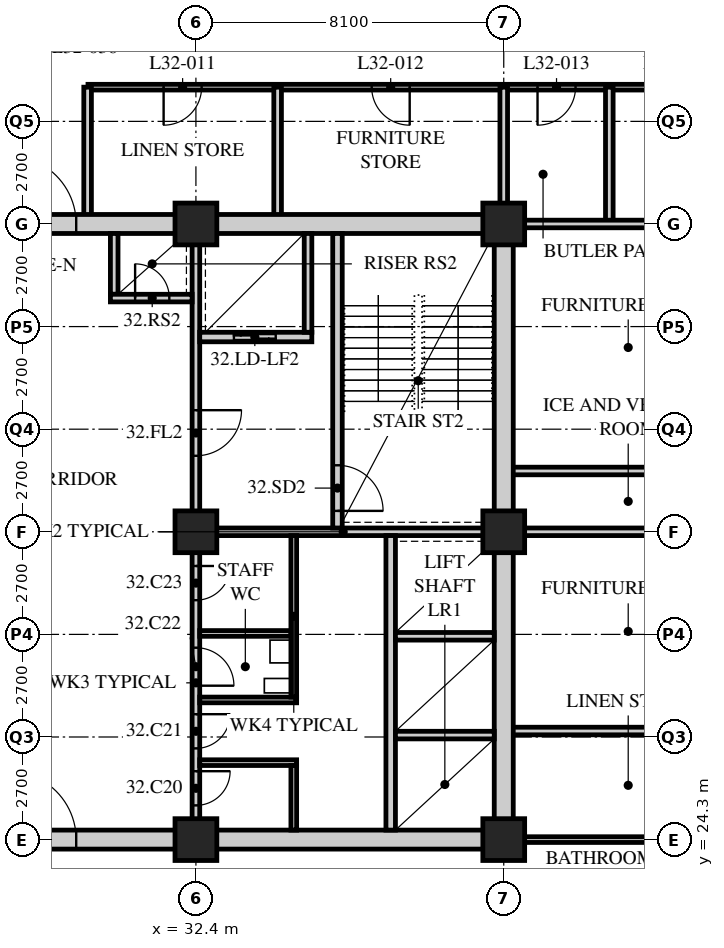
"""IFC4 building model, lengths in metres.
Left out: names, types, materials, properties, quantities, classifications, styles, units other than length and angle.
Written with IfcOpenShell. Run it as: python <this file> out.ifc"""

import sys

from ifc_helpers import new_model, si_unit, direction, frame, frame_2d, origin, origin_2d, place, context, subcontext, project, spatial, rectangle, hollow_rectangle, extrude, element, fill, save


model = new_model("IFC4")
c1 = context("Model", 3, precision=1e-05, world=origin(), true_north=direction((0.0, 1.0)))
c2 = subcontext(c1, "Body", "Model", "MODEL_VIEW")
j1 = project(units=[si_unit("LENGTHUNIT", "METRE"), si_unit("PLANEANGLEUNIT", "RADIAN")], contexts=[c1])
p1 = place(None, origin())
s1 = spatial("IfcSite", under=j1, at=p1, CompositionType="ELEMENT")
p2 = place(p1, origin())
s2 = spatial("IfcBuilding", under=s1, at=p2, CompositionType="ELEMENT")
p3 = place(p2, frame((0.0, 0.0, 127.2)))
s3 = spatial("IfcBuildingStorey", under=s2, at=p3, CompositionType="ELEMENT", Elevation=127.2)
for number, where, z_axis, x_axis in (
    (1, (32.4, 24.3, 0.0), (0.0, 0.0, 1.0), (1.0, 0.0, 0.0)),
    (2, (32.4, 32.4, 0.0), (0.0, 0.0, 1.0), (1.0, 0.0, 0.0)),
    (3, (32.4, 40.5, 0.0), (0.0, 0.0, 1.0), (1.0, 0.0, 0.0)),
    (4, (40.5, 24.3, 0.0), (0.0, 0.0, 1.0), (1.0, 0.0, 0.0)),
    (5, (40.5, 32.4, 0.0), (0.0, 0.0, 1.0), (1.0, 0.0, 0.0)),
    (6, (40.5, 40.5, 0.0), (0.0, 0.0, 1.0), (1.0, 0.0, 0.0)),
):
    element("IfcColumn", number, at=place(p3, frame(where, z_axis=z_axis, x_axis=x_axis)), inside=s3, PredefinedType="COLUMN", context=c2, shape_type="SweptSolid", body=[
        extrude(hollow_rectangle(XDim=1.1, YDim=1.1, WallThickness=0.1, at=origin_2d()), origin(), (0.0, 0.0, 1.0), 3.4),
    ])
p4 = place(p3, frame((46.8, 44.1, 0.0), z_axis=(0.0, 0.0, 1.0), x_axis=(-1.0, 0.0, 0.0)))
e7 = element("IfcWall", 7, at=p4, inside=s3, PredefinedType="PARTITIONING", context=c2, shape_type="SweptSolid", body=[
    extrude(rectangle(XDim=17.24, YDim=0.15, at=frame_2d((8.62, 0.0))), origin(), (0.0, 0.0, 1.0), 3.19),
])
p5 = place(p4, frame((14.25, 0.0, 0.0)))
e8 = element("IfcOpeningElement", 8, at=p5, cuts=e7, PredefinedType="OPENING", context=c2, shape_type="SweptSolid", body=[
    extrude(rectangle(XDim=1.0, YDim=2.1, at=frame_2d((0.5, 1.05))), frame((0.0, 0.085, 0.0), z_axis=(0.0, -1.0, 0.0), x_axis=(1.0, 0.0, 0.0)), (0.0, 0.0, 1.0), 0.17),
])
p6 = place(p4, frame((8.775, 0.0, 0.0)))
e9 = element("IfcOpeningElement", 9, at=p6, cuts=e7, PredefinedType="OPENING", context=c2, shape_type="SweptSolid", body=[
    extrude(rectangle(XDim=1.0, YDim=2.1, at=frame_2d((0.5, 1.05))), frame((0.0, 0.085, 0.0), z_axis=(0.0, -1.0, 0.0), x_axis=(1.0, 0.0, 0.0)), (0.0, 0.0, 1.0), 0.17),
])
p7 = place(p4, frame((4.411, 0.0, 0.0)))
e10 = element("IfcOpeningElement", 10, at=p7, cuts=e7, PredefinedType="OPENING", context=c2, shape_type="SweptSolid", body=[
    extrude(rectangle(XDim=1.0, YDim=2.1, at=frame_2d((0.5, 1.05))), frame((0.0, 0.085, 0.0), z_axis=(0.0, -1.0, 0.0), x_axis=(1.0, 0.0, 0.0)), (0.0, 0.0, 1.0), 0.17),
])
p8 = place(p4, frame((1.261, 0.0, 0.0)))
e11 = element("IfcOpeningElement", 11, at=p8, cuts=e7, PredefinedType="OPENING", context=c2, shape_type="SweptSolid", body=[
    extrude(rectangle(XDim=1.0, YDim=2.1, at=frame_2d((0.5, 1.05))), frame((0.0, 0.085, 0.0), z_axis=(0.0, -1.0, 0.0), x_axis=(1.0, 0.0, 0.0)), (0.0, 0.0, 1.0), 0.17),
])
p9 = place(p3, frame((40.7, 24.3, 0.0), z_axis=(0.0, 0.0, 1.0), x_axis=(1.0, 0.0, 0.0)))
e12 = element("IfcWall", 12, at=p9, inside=s3, PredefinedType="PARTITIONING", context=c2, shape_type="SweptSolid", body=[
    extrude(rectangle(XDim=6.1, YDim=0.15, at=frame_2d((3.05, 0.0))), origin(), (0.0, 0.0, 1.0), 3.19),
])
for number, where, z_axis, x_axis in (
    (13, (40.5, 32.4, 0.0), (0.0, 0.0, 1.0), (1.0, 0.0, 0.0)),
    (14, (46.8, 27.157, 0.0), (0.0, 0.0, 1.0), (-1.0, 0.0, 0.0)),
    (15, (46.8, 34.0, 0.0), (0.0, 0.0, 1.0), (-1.0, 0.0, 0.0)),
):
    element("IfcWall", number, at=place(p3, frame(where, z_axis=z_axis, x_axis=x_axis)), inside=s3, PredefinedType="SOLIDWALL", context=c2, shape_type="SweptSolid", body=[
        extrude(rectangle(XDim=6.3, YDim=0.2, at=frame_2d((3.15, 0.0))), origin(), (0.0, 0.0, 1.0), 3.19),
    ])
p10 = place(p3, frame((40.5, 40.5, 0.0), z_axis=(0.0, 0.0, 1.0), x_axis=(0.0, 1.0, 0.0)))
e16 = element("IfcWall", 16, at=p10, inside=s3, PredefinedType="SOLIDWALL", context=c2, shape_type="SweptSolid", body=[
    extrude(rectangle(XDim=3.6, YDim=0.2, at=frame_2d((1.8, 0.0))), origin(), (0.0, 0.0, 1.0), 2.578),
])
for number, where, z_axis, x_axis in (
    (17, (34.55, 44.1, 0.0), (0.0, 0.0, 1.0), (0.0, -1.0, 0.0)),
    (18, (43.278, 44.1, 0.0), (0.0, 0.0, 1.0), (0.0, -1.0, 0.0)),
    (19, (29.55, 40.5, 0.0), (0.0, 0.0, 1.0), (0.0, 1.0, 0.0)),
):
    element("IfcWall", number, at=place(p3, frame(where, z_axis=z_axis, x_axis=x_axis)), inside=s3, PredefinedType="SOLIDWALL", context=c2, shape_type="SweptSolid", body=[
        extrude(rectangle(XDim=3.6, YDim=0.2, at=frame_2d((1.8, 0.0))), origin(), (0.0, 0.0, 1.0), 3.19),
    ])
p11 = place(p3, frame((40.5, 40.5, 0.0), z_axis=(0.0, 0.0, 1.0), x_axis=(1.0, 0.0, 0.0)))
e20 = element("IfcWall", 20, at=p11, inside=s3, PredefinedType="SOLIDWALL", context=c2, shape_type="SweptSolid", body=[
    extrude(rectangle(XDim=6.3, YDim=0.2, at=frame_2d((3.15, 0.0))), origin(), (0.0, 0.0, 1.0), 3.19),
])
p12 = place(p3, frame((15.95, 24.3, 0.0), z_axis=(0.0, 0.0, 1.0), x_axis=(1.0, 0.0, 0.0)))
e21 = element("IfcWall", 21, at=p12, inside=s3, PredefinedType="SOLIDWALL", context=c2, shape_type="SweptSolid", body=[
    extrude(rectangle(XDim=24.8, YDim=0.5, at=frame_2d((12.4, 0.0))), origin(), (0.0, 0.0, 1.0), 2.54),
])
p13 = place(p12, frame((11.5, 0.0, 0.0)))
e22 = element("IfcOpeningElement", 22, at=p13, cuts=e21, PredefinedType="OPENING", context=c2, shape_type="SweptSolid", body=[
    extrude(rectangle(XDim=1.8, YDim=2.4, at=frame_2d((0.9, 1.2))), frame((0.0, 0.26, 0.0), z_axis=(0.0, -1.0, 0.0), x_axis=(1.0, 0.0, 0.0)), (0.0, 0.0, 1.0), 0.52),
])
p14 = place(p3, frame((15.95, 40.5, 0.0), z_axis=(0.0, 0.0, 1.0), x_axis=(1.0, 0.0, 0.0)))
e23 = element("IfcWall", 23, at=p14, inside=s3, PredefinedType="SOLIDWALL", context=c2, shape_type="SweptSolid", body=[
    extrude(rectangle(XDim=24.8, YDim=0.5, at=frame_2d((12.4, 0.0))), origin(), (0.0, 0.0, 1.0), 2.54),
])
p15 = place(p14, frame((11.5, 0.0, 0.0)))
e24 = element("IfcOpeningElement", 24, at=p15, cuts=e23, PredefinedType="OPENING", context=c2, shape_type="SweptSolid", body=[
    extrude(rectangle(XDim=1.8, YDim=2.4, at=frame_2d((0.9, 1.2))), frame((0.0, 0.26, 0.0), z_axis=(0.0, -1.0, 0.0), x_axis=(1.0, 0.0, 0.0)), (0.0, 0.0, 1.0), 0.52),
])
p16 = place(p3, frame((40.5, 24.55, 0.0), z_axis=(0.0, 0.0, 1.0), x_axis=(0.0, 1.0, 0.0)))
e25 = element("IfcWall", 25, at=p16, inside=s3, PredefinedType="SOLIDWALL", context=c2, shape_type="SweptSolid", body=[
    extrude(rectangle(XDim=15.7, YDim=0.5, at=frame_2d((7.85, 0.0))), origin(), (0.0, 0.0, 1.0), 2.578),
])
p17 = place(p3, frame((32.3, 32.4, 0.0), z_axis=(0.0, 0.0, 1.0), x_axis=(1.0, 0.0, 0.0)))
e26 = element("IfcWall", 26, at=p17, inside=s3, PredefinedType="SOLIDWALL", context=c2, shape_type="SweptSolid", body=[
    extrude(rectangle(XDim=7.95, YDim=0.2, at=frame_2d((3.975, 0.0))), origin(), (0.0, 0.0, 1.0), 2.578),
])
p18 = place(p3, frame((32.4, 32.5, 0.0), z_axis=(0.0, 0.0, 1.0), x_axis=(0.0, 1.0, 0.0)))
e27 = element("IfcWall", 27, at=p18, inside=s3, PredefinedType="SOLIDWALL", context=c2, shape_type="SweptSolid", body=[
    extrude(rectangle(XDim=7.75, YDim=0.2, at=frame_2d((3.875, 0.0))), origin(), (0.0, 0.0, 1.0), 2.578),
])
p19 = place(p18, frame((1.9, 0.0, 0.0)))
e28 = element("IfcOpeningElement", 28, at=p19, cuts=e27, PredefinedType="OPENING", context=c2, shape_type="SweptSolid", body=[
    extrude(rectangle(XDim=1.2, YDim=2.1, at=frame_2d((0.6, 1.05))), frame((0.0, 0.11, 0.0), z_axis=(0.0, -1.0, 0.0), x_axis=(1.0, 0.0, 0.0)), (0.0, 0.0, 1.0), 0.22),
])
p20 = place(p3, frame((37.525, 24.55, 0.0), z_axis=(0.0, 0.0, 1.0), x_axis=(0.0, 1.0, 0.0)))
e29 = element("IfcWall", 29, at=p20, inside=s3, PredefinedType="SOLIDWALL", context=c2, shape_type="SweptSolid", body=[
    extrude(rectangle(XDim=7.75, YDim=0.25, at=frame_2d((3.875, 0.0))), origin(), (0.0, 0.0, 1.0), 3.19),
])
for number, where, z_axis, x_axis in (
    (30, (37.65, 27.05, 0.0), (0.0, 0.0, 1.0), (1.0, 0.0, 0.0)),
    (31, (37.65, 29.65, 0.0), (0.0, 0.0, 1.0), (1.0, 0.0, 0.0)),
):
    element("IfcWall", number, at=place(p3, frame(where, z_axis=z_axis, x_axis=x_axis)), inside=s3, PredefinedType="SOLIDWALL", context=c2, shape_type="SweptSolid", body=[
        extrude(rectangle(XDim=2.6, YDim=0.2, at=frame_2d((1.3, 0.0))), origin(), (0.0, 0.0, 1.0), 3.19),
    ])
p21 = place(p3, frame((36.125, 32.5, 0.0), z_axis=(0.0, 0.0, 1.0), x_axis=(0.0, 1.0, 0.0)))
e32 = element("IfcWall", 32, at=p21, inside=s3, PredefinedType="SOLIDWALL", context=c2, shape_type="SweptSolid", body=[
    extrude(rectangle(XDim=7.75, YDim=0.25, at=frame_2d((3.875, 0.0))), origin(), (0.0, 0.0, 1.0), 3.19),
])
p22 = place(p21, frame((0.45, 0.0, 0.0)))
e33 = element("IfcOpeningElement", 33, at=p22, cuts=e32, PredefinedType="OPENING", context=c2, shape_type="SweptSolid", body=[
    extrude(rectangle(XDim=1.2, YDim=2.1, at=frame_2d((0.6, 1.05))), frame((0.0, 0.135, 0.0), z_axis=(0.0, -1.0, 0.0), x_axis=(1.0, 0.0, 0.0)), (0.0, 0.0, 1.0), 0.27),
])
p23 = place(p3, frame((32.5, 37.525, 0.0), z_axis=(0.0, 0.0, 1.0), x_axis=(1.0, 0.0, 0.0)))
e34 = element("IfcWall", 34, at=p23, inside=s3, PredefinedType="SOLIDWALL", context=c2, shape_type="SweptSolid", body=[
    extrude(rectangle(XDim=2.95, YDim=0.25, at=frame_2d((1.475, 0.0))), origin(), (0.0, 0.0, 1.0), 3.19),
])
p24 = place(p23, frame((0.9, 0.0, 0.0)))
e35 = element("IfcOpeningElement", 35, at=p24, cuts=e34, PredefinedType="OPENING", context=c2, shape_type="SweptSolid", body=[
    extrude(rectangle(XDim=1.1, YDim=2.4, at=frame_2d((0.55, 1.2))), frame((0.0, 0.135, 0.0), z_axis=(0.0, -1.0, 0.0), x_axis=(1.0, 0.0, 0.0)), (0.0, 0.0, 1.0), 0.27),
])
p25 = place(p3, frame((35.35, 37.65, 0.0), z_axis=(0.0, 0.0, 1.0), x_axis=(0.0, 1.0, 0.0)))
e36 = element("IfcWall", 36, at=p25, inside=s3, PredefinedType="SOLIDWALL", context=c2, shape_type="SweptSolid", body=[
    extrude(rectangle(XDim=2.6, YDim=0.2, at=frame_2d((1.3, 0.0))), origin(), (0.0, 0.0, 1.0), 3.19),
])
p26 = place(p3, frame((30.25, 38.65, 0.0), z_axis=(0.0, 0.0, 1.0), x_axis=(0.0, 1.0, 0.0)))
e37 = element("IfcWall", 37, at=p26, inside=s3, PredefinedType="SOLIDWALL", context=c2, shape_type="SweptSolid", body=[
    extrude(rectangle(XDim=1.6, YDim=0.2, at=frame_2d((0.8, 0.0))), origin(), (0.0, 0.0, 1.0), 3.19),
])
p27 = place(p3, frame((30.15, 38.55, 0.0), z_axis=(0.0, 0.0, 1.0), x_axis=(1.0, 0.0, 0.0)))
e38 = element("IfcWall", 38, at=p27, inside=s3, PredefinedType="SOLIDWALL", context=c2, shape_type="SweptSolid", body=[
    extrude(rectangle(XDim=2.15, YDim=0.2, at=frame_2d((1.075, 0.0))), origin(), (0.0, 0.0, 1.0), 3.19),
])
p28 = place(p27, frame((0.65, 0.0, 0.0)))
e39 = element("IfcOpeningElement", 39, at=p28, cuts=e38, PredefinedType="OPENING", context=c2, shape_type="SweptSolid", body=[
    extrude(rectangle(XDim=0.9, YDim=2.1, at=frame_2d((0.45, 1.05))), frame((0.0, 0.11, 0.0), z_axis=(0.0, -1.0, 0.0), x_axis=(1.0, 0.0, 0.0)), (0.0, 0.0, 1.0), 0.22),
])
p29 = place(p3, frame((32.4, 24.55, 0.0), z_axis=(0.0, 0.0, 1.0), x_axis=(0.0, 1.0, 0.0)))
e40 = element("IfcWall", 40, at=p29, inside=s3, PredefinedType="PARTITIONING", context=c2, shape_type="SweptSolid", body=[
    extrude(rectangle(XDim=7.75, YDim=0.2, at=frame_2d((3.875, 0.0))), origin(), (0.0, 0.0, 1.0), 2.578),
])
p30 = place(p29, frame((0.65, 0.0, 0.0)))
e41 = element("IfcOpeningElement", 41, at=p30, cuts=e40, PredefinedType="OPENING", context=c2, shape_type="SweptSolid", body=[
    extrude(rectangle(XDim=0.9, YDim=2.1, at=frame_2d((0.45, 1.05))), frame((0.0, 0.11, 0.0), z_axis=(0.0, -1.0, 0.0), x_axis=(1.0, 0.0, 0.0)), (0.0, 0.0, 1.0), 0.22),
])
p31 = place(p29, frame((2.15, 0.0, 0.0)))
e42 = element("IfcOpeningElement", 42, at=p31, cuts=e40, PredefinedType="OPENING", context=c2, shape_type="SweptSolid", body=[
    extrude(rectangle(XDim=0.9, YDim=2.1, at=frame_2d((0.45, 1.05))), frame((0.0, 0.11, 0.0), z_axis=(0.0, -1.0, 0.0), x_axis=(1.0, 0.0, 0.0)), (0.0, 0.0, 1.0), 0.22),
])
p32 = place(p29, frame((3.8, 0.0, 0.0)))
e43 = element("IfcOpeningElement", 43, at=p32, cuts=e40, PredefinedType="OPENING", context=c2, shape_type="SweptSolid", body=[
    extrude(rectangle(XDim=1.0, YDim=2.1, at=frame_2d((0.5, 1.05))), frame((0.0, 0.11, 0.0), z_axis=(0.0, -1.0, 0.0), x_axis=(1.0, 0.0, 0.0)), (0.0, 0.0, 1.0), 0.22),
])
p33 = place(p29, frame((6.05, 0.0, 0.0)))
e44 = element("IfcOpeningElement", 44, at=p33, cuts=e40, PredefinedType="OPENING", context=c2, shape_type="SweptSolid", body=[
    extrude(rectangle(XDim=0.9, YDim=2.1, at=frame_2d((0.45, 1.05))), frame((0.0, 0.11, 0.0), z_axis=(0.0, -1.0, 0.0), x_axis=(1.0, 0.0, 0.0)), (0.0, 0.0, 1.0), 0.22),
])
for number, where, z_axis, x_axis in (
    (45, (32.5, 26.325, 0.0), (0.0, 0.0, 1.0), (1.0, 0.0, 0.0)),
    (46, (32.5, 27.975, 0.0), (0.0, 0.0, 1.0), (1.0, 0.0, 0.0)),
):
    element("IfcWall", number, at=place(p3, frame(where, z_axis=z_axis, x_axis=x_axis)), inside=s3, PredefinedType="PARTITIONING", context=c2, shape_type="SweptSolid", body=[
        extrude(rectangle(XDim=2.55, YDim=0.15, at=frame_2d((1.275, 0.0))), origin(), (0.0, 0.0, 1.0), 3.19),
    ])
p34 = place(p3, frame((32.5, 29.725, 0.0), z_axis=(0.0, 0.0, 1.0), x_axis=(1.0, 0.0, 0.0)))
e47 = element("IfcWall", 47, at=p34, inside=s3, PredefinedType="PARTITIONING", context=c2, shape_type="SweptSolid", body=[
    extrude(rectangle(XDim=2.4, YDim=0.15, at=frame_2d((1.2, 0.0))), origin(), (0.0, 0.0, 1.0), 3.19),
])
p35 = place(p3, frame((34.975, 24.55, 0.0), z_axis=(0.0, 0.0, 1.0), x_axis=(0.0, 1.0, 0.0)))
e48 = element("IfcWall", 48, at=p35, inside=s3, PredefinedType="PARTITIONING", context=c2, shape_type="SweptSolid", body=[
    extrude(rectangle(XDim=1.7, YDim=0.15, at=frame_2d((0.85, 0.0))), origin(), (0.0, 0.0, 1.0), 3.19),
])
p36 = place(p3, frame((34.975, 28.05, 0.0), z_axis=(0.0, 0.0, 1.0), x_axis=(0.0, 1.0, 0.0)))
e49 = element("IfcWall", 49, at=p36, inside=s3, PredefinedType="PARTITIONING", context=c2, shape_type="SweptSolid", body=[
    extrude(rectangle(XDim=4.25, YDim=0.15, at=frame_2d((2.125, 0.0))), origin(), (0.0, 0.0, 1.0), 3.19),
])
p37 = place(p5, origin())
e50 = element("IfcDoor", 50, at=p37, inside=s3, OperationType="SINGLE_SWING_RIGHT", PredefinedType="DOOR", context=c2, shape_type="SweptSolid", body=[
    extrude(rectangle(XDim=1.0, YDim=2.1, at=frame_2d((0.5, 1.05))), frame((0.0, 0.025, 0.0), z_axis=(0.0, -1.0, 0.0), x_axis=(1.0, 0.0, 0.0)), (0.0, 0.0, 1.0), 0.05),
])
fill(e8, e50)
p38 = place(p6, origin())
e51 = element("IfcDoor", 51, at=p38, inside=s3, OperationType="SINGLE_SWING_LEFT", PredefinedType="DOOR", context=c2, shape_type="SweptSolid", body=[
    extrude(rectangle(XDim=1.0, YDim=2.1, at=frame_2d((0.5, 1.05))), frame((0.0, 0.025, 0.0), z_axis=(0.0, -1.0, 0.0), x_axis=(1.0, 0.0, 0.0)), (0.0, 0.0, 1.0), 0.05),
])
fill(e9, e51)
p39 = place(p7, origin())
e52 = element("IfcDoor", 52, at=p39, inside=s3, OperationType="SINGLE_SWING_RIGHT", PredefinedType="DOOR", context=c2, shape_type="SweptSolid", body=[
    extrude(rectangle(XDim=1.0, YDim=2.1, at=frame_2d((0.5, 1.05))), frame((0.0, 0.025, 0.0), z_axis=(0.0, -1.0, 0.0), x_axis=(1.0, 0.0, 0.0)), (0.0, 0.0, 1.0), 0.05),
])
fill(e10, e52)
p40 = place(p30, origin())
e53 = element("IfcDoor", 53, at=p40, inside=s3, OperationType="SINGLE_SWING_LEFT", PredefinedType="DOOR", context=c2, shape_type="SweptSolid", body=[
    extrude(rectangle(XDim=0.9, YDim=2.1, at=frame_2d((0.45, 1.05))), frame((0.0, 0.025, 0.0), z_axis=(0.0, -1.0, 0.0), x_axis=(1.0, 0.0, 0.0)), (0.0, 0.0, 1.0), 0.05),
])
fill(e41, e53)
p41 = place(p31, origin())
e54 = element("IfcDoor", 54, at=p41, inside=s3, OperationType="SINGLE_SWING_LEFT", PredefinedType="DOOR", context=c2, shape_type="SweptSolid", body=[
    extrude(rectangle(XDim=0.9, YDim=2.1, at=frame_2d((0.45, 1.05))), frame((0.0, 0.025, 0.0), z_axis=(0.0, -1.0, 0.0), x_axis=(1.0, 0.0, 0.0)), (0.0, 0.0, 1.0), 0.05),
])
fill(e42, e54)
p42 = place(p32, origin())
e55 = element("IfcDoor", 55, at=p42, inside=s3, OperationType="SINGLE_SWING_RIGHT", PredefinedType="DOOR", context=c2, shape_type="SweptSolid", body=[
    extrude(rectangle(XDim=1.0, YDim=2.1, at=frame_2d((0.5, 1.05))), frame((0.0, 0.025, 0.0), z_axis=(0.0, -1.0, 0.0), x_axis=(1.0, 0.0, 0.0)), (0.0, 0.0, 1.0), 0.05),
])
fill(e43, e55)
p43 = place(p33, origin())
e56 = element("IfcDoor", 56, at=p43, inside=s3, OperationType="SINGLE_SWING_LEFT", PredefinedType="DOOR", context=c2, shape_type="SweptSolid", body=[
    extrude(rectangle(XDim=0.9, YDim=2.1, at=frame_2d((0.45, 1.05))), frame((0.0, 0.025, 0.0), z_axis=(0.0, -1.0, 0.0), x_axis=(1.0, 0.0, 0.0)), (0.0, 0.0, 1.0), 0.05),
])
fill(e44, e56)
p44 = place(p22, origin())
e57 = element("IfcDoor", 57, at=p44, inside=s3, OperationType="SINGLE_SWING_RIGHT", PredefinedType="DOOR", context=c2, shape_type="SweptSolid", body=[
    extrude(rectangle(XDim=1.2, YDim=2.1, at=frame_2d((0.6, 1.05))), frame((0.0, 0.025, 0.0), z_axis=(0.0, -1.0, 0.0), x_axis=(1.0, 0.0, 0.0)), (0.0, 0.0, 1.0), 0.05),
])
fill(e33, e57)
p45 = place(p19, origin())
e58 = element("IfcDoor", 58, at=p45, inside=s3, OperationType="SINGLE_SWING_LEFT", PredefinedType="DOOR", context=c2, shape_type="SweptSolid", body=[
    extrude(rectangle(XDim=1.2, YDim=2.1, at=frame_2d((0.6, 1.05))), frame((0.0, 0.025, 0.0), z_axis=(0.0, -1.0, 0.0), x_axis=(1.0, 0.0, 0.0)), (0.0, 0.0, 1.0), 0.05),
])
fill(e28, e58)
p46 = place(p28, origin())
e59 = element("IfcDoor", 59, at=p46, inside=s3, OperationType="SINGLE_SWING_LEFT", PredefinedType="DOOR", context=c2, shape_type="SweptSolid", body=[
    extrude(rectangle(XDim=0.9, YDim=2.1, at=frame_2d((0.45, 1.05))), frame((0.0, 0.025, 0.0), z_axis=(0.0, -1.0, 0.0), x_axis=(1.0, 0.0, 0.0)), (0.0, 0.0, 1.0), 0.05),
])
fill(e39, e59)
p47 = place(p24, origin())
e60 = element("IfcDoor", 60, at=p47, inside=s3, OperationType="DOUBLE_DOOR_SLIDING", PredefinedType="DOOR", context=c2, shape_type="SweptSolid", body=[
    extrude(rectangle(XDim=1.1, YDim=2.4, at=frame_2d((0.55, 1.2))), frame((0.0, 0.025, 0.0), z_axis=(0.0, -1.0, 0.0), x_axis=(1.0, 0.0, 0.0)), (0.0, 0.0, 1.0), 0.05),
])
fill(e35, e60)
p48 = place(p13, origin())
e61 = element("IfcDoor", 61, at=p48, inside=s3, OperationType="DOUBLE_DOOR_SINGLE_SWING", PredefinedType="DOOR", context=c2, shape_type="SweptSolid", body=[
    extrude(rectangle(XDim=1.8, YDim=2.4, at=frame_2d((0.9, 1.2))), frame((0.0, 0.025, 0.0), z_axis=(0.0, -1.0, 0.0), x_axis=(1.0, 0.0, 0.0)), (0.0, 0.0, 1.0), 0.05),
])
fill(e22, e61)
p49 = place(p15, origin())
e62 = element("IfcDoor", 62, at=p49, inside=s3, OperationType="DOUBLE_DOOR_SINGLE_SWING", PredefinedType="DOOR", context=c2, shape_type="SweptSolid", body=[
    extrude(rectangle(XDim=1.8, YDim=2.4, at=frame_2d((0.9, 1.2))), frame((0.0, 0.025, 0.0), z_axis=(0.0, -1.0, 0.0), x_axis=(1.0, 0.0, 0.0)), (0.0, 0.0, 1.0), 0.05),
])
fill(e24, e62)
save(model, sys.argv[1])
